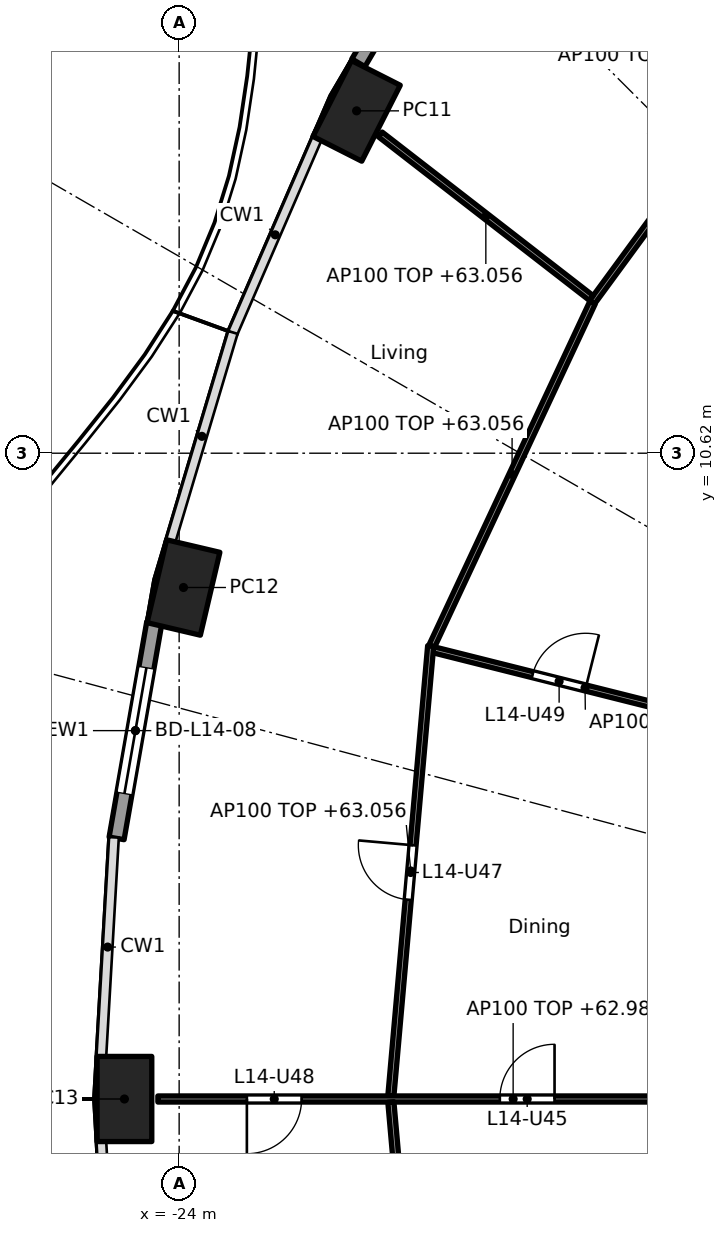
"""IFC4 building model, lengths in metres.
Left out: names, types, materials, properties, quantities, classifications, styles, units other than length and angle.
Written with IfcOpenShell. Run it as: python <this file> out.ifc"""

import sys

from ifc_helpers import new_model, si_unit, direction, frame, frame_2d, origin, origin_2d, place, context, subcontext, project, spatial, rectangle, hollow_rectangle, extrude, element, fill, save


model = new_model("IFC4")
c1 = context("Model", 3, precision=1e-05, world=origin(), true_north=direction((0.0, 1.0)))
c2 = subcontext(c1, "Body", "Model", "MODEL_VIEW")
j1 = project(units=[si_unit("LENGTHUNIT", "METRE"), si_unit("PLANEANGLEUNIT", "RADIAN")], contexts=[c1])
p1 = place(None, origin())
s1 = spatial("IfcSite", under=j1, at=p1, CompositionType="ELEMENT")
p2 = place(p1, origin())
s2 = spatial("IfcBuilding", under=s1, at=p2, CompositionType="ELEMENT")
p3 = place(p2, frame((0.0, 0.0, 60.3)))
s3 = spatial("IfcBuildingStorey", under=s2, at=p3, CompositionType="ELEMENT", Elevation=60.3)
for number, where, z_axis, x_axis in (
    (1, (-21.082, 16.25, 0.0), (0.0, 0.0, 1.0), (-0.452, -0.892, 0.0)),
    (2, (-23.929, 8.412, 0.0), (0.0, 0.0, 1.0), (-0.229, -0.973, 0.0)),
    (3, (-24.9, 0.0, 0.0), (0.0, 0.0, 1.0), (0.0, -1.0, 0.0)),
):
    element("IfcColumn", number, at=place(p3, frame(where, z_axis=z_axis, x_axis=x_axis)), inside=s3, PredefinedType="COLUMN", context=c2, shape_type="SweptSolid", body=[
        extrude(hollow_rectangle(XDim=1.4, YDim=0.9, WallThickness=0.05, at=origin_2d()), origin(), (0.0, 0.0, 1.0), 3.7),
    ])
p4 = place(p3, frame((-21.052, 17.04, 0.0), z_axis=(0.0, 0.0, 1.0), x_axis=(0.506311160839, 0.862350861546, 0.0)))
e4 = element("IfcWall", 4, at=p4, inside=s3, PredefinedType="SOLIDWALL", context=c2, shape_type="SweptSolid", body=[
    extrude(rectangle(XDim=3.462, YDim=0.25, at=frame_2d((1.731, 0.0))), origin(), (0.0, 0.0, 1.0), 3.44),
])
p5 = place(p4, frame((0.681, 0.0, 0.0)))
e5 = element("IfcOpeningElement", 5, at=p5, cuts=e4, PredefinedType="OPENING", context=c2, shape_type="SweptSolid", body=[
    extrude(rectangle(XDim=2.1, YDim=2.4, at=frame_2d((1.05, 1.2))), frame((0.0, 0.135, 0.0), z_axis=(0.0, -1.0, 0.0), x_axis=(1.0, 0.0, 0.0)), (0.0, 0.0, 1.0), 0.27),
])
p6 = place(p3, frame((-25.029, 4.286, 0.0), z_axis=(0.0, 0.0, 1.0), x_axis=(0.172217377323, 0.98505897029, 0.0)))
e6 = element("IfcWall", 6, at=p6, inside=s3, PredefinedType="SOLIDWALL", context=c2, shape_type="SweptSolid", body=[
    extrude(rectangle(XDim=3.598, YDim=0.25, at=frame_2d((1.799, 0.0))), origin(), (0.0, 0.0, 1.0), 3.44),
])
p7 = place(p6, frame((0.749, 0.0, 0.0)))
e7 = element("IfcOpeningElement", 7, at=p7, cuts=e6, PredefinedType="OPENING", context=c2, shape_type="SweptSolid", body=[
    extrude(rectangle(XDim=2.1, YDim=2.4, at=frame_2d((1.05, 1.2))), frame((0.0, 0.135, 0.0), z_axis=(0.0, -1.0, 0.0), x_axis=(1.0, 0.0, 0.0)), (0.0, 0.0, 1.0), 0.27),
])
p8 = place(p3, frame((-10.126, 13.641, 0.0), z_axis=(0.0, 0.0, 1.0), x_axis=(-0.57313289907, 0.819462433552, 0.0)))
e8 = element("IfcWall", 8, at=p8, inside=s3, PredefinedType="PARTITIONING", context=c2, shape_type="SweptSolid", body=[
    extrude(rectangle(XDim=10.794, YDim=0.1, at=frame_2d((5.397, 0.0))), origin(), (0.0, 0.0, 1.0), 2.756),
])
p9 = place(p8, frame((2.424, 0.0, 0.0)))
e9 = element("IfcOpeningElement", 9, at=p9, cuts=e8, PredefinedType="OPENING", context=c2, shape_type="SweptSolid", body=[
    extrude(rectangle(XDim=0.9, YDim=2.1, at=frame_2d((0.45, 1.05))), frame((0.0, 0.06, 0.0), z_axis=(0.0, -1.0, 0.0), x_axis=(1.0, 0.0, 0.0)), (0.0, 0.0, 1.0), 0.12),
])
p10 = place(p3, frame((-13.421, 18.269, 0.0), z_axis=(0.0, 0.0, 1.0), x_axis=(-0.591206785834, -0.806520016109, 0.0)))
e10 = element("IfcWall", 10, at=p10, inside=s3, PredefinedType="PARTITIONING", context=c2, shape_type="SweptSolid", body=[
    extrude(rectangle(XDim=6.41, YDim=0.1, at=frame_2d((3.205, 0.0))), origin(), (0.0, 0.0, 1.0), 2.756),
])
p11 = place(p10, frame((2.73, 0.0, 0.0)))
e11 = element("IfcOpeningElement", 11, at=p11, cuts=e10, PredefinedType="OPENING", context=c2, shape_type="SweptSolid", body=[
    extrude(rectangle(XDim=0.9, YDim=2.1, at=frame_2d((0.45, 1.05))), frame((0.0, 0.06, 0.0), z_axis=(0.0, -1.0, 0.0), x_axis=(1.0, 0.0, 0.0)), (0.0, 0.0, 1.0), 0.12),
])
p12 = place(p3, frame((-17.221, 13.171, 0.0), z_axis=(0.0, 0.0, 1.0), x_axis=(-0.790258254068, 0.612773932113, 0.0)))
e12 = element("IfcWall", 12, at=p12, inside=s3, PredefinedType="PARTITIONING", context=c2, shape_type="SweptSolid", body=[
    extrude(rectangle(XDim=4.392, YDim=0.1, at=frame_2d((2.196, 0.0))), origin(), (0.0, 0.0, 1.0), 2.756),
])
p13 = place(p3, frame((-17.203, 13.095, 0.0), z_axis=(0.0, 0.0, 1.0), x_axis=(-0.423892287987, -0.905712607942, 0.0)))
e13 = element("IfcWall", 13, at=p13, inside=s3, PredefinedType="PARTITIONING", context=c2, shape_type="SweptSolid", body=[
    extrude(rectangle(XDim=6.238, YDim=0.1, at=frame_2d((3.119, 0.0))), origin(), (0.0, 0.0, 1.0), 2.756),
])
p14 = place(p3, frame((-14.831, 6.135, 0.0), z_axis=(0.0, 0.0, 1.0), x_axis=(-0.96988230015, 0.243574062362, 0.0)))
e14 = element("IfcWall", 14, at=p14, inside=s3, PredefinedType="PARTITIONING", context=c2, shape_type="SweptSolid", body=[
    extrude(rectangle(XDim=5.144, YDim=0.1, at=frame_2d((2.572, 0.0))), origin(), (0.0, 0.0, 1.0), 3.44),
])
p15 = place(p14, frame((2.561, 0.0, 0.0)))
e15 = element("IfcOpeningElement", 15, at=p15, cuts=e14, PredefinedType="OPENING", context=c2, shape_type="SweptSolid", body=[
    extrude(rectangle(XDim=0.9, YDim=2.1, at=frame_2d((0.45, 1.05))), frame((0.0, 0.06, 0.0), z_axis=(0.0, -1.0, 0.0), x_axis=(1.0, 0.0, 0.0)), (0.0, 0.0, 1.0), 0.12),
])
p16 = place(p3, frame((-19.864, 7.45, 0.0), z_axis=(0.0, 0.0, 1.0), x_axis=(-0.088138375539, -0.996108240483, 0.0)))
e16 = element("IfcWall", 16, at=p16, inside=s3, PredefinedType="PARTITIONING", context=c2, shape_type="SweptSolid", body=[
    extrude(rectangle(XDim=7.429, YDim=0.1, at=frame_2d((3.714, 0.0))), origin(), (0.0, 0.0, 1.0), 2.756),
])
p17 = place(p16, frame((3.29, 0.0, 0.0)))
e17 = element("IfcOpeningElement", 17, at=p17, cuts=e16, PredefinedType="OPENING", context=c2, shape_type="SweptSolid", body=[
    extrude(rectangle(XDim=0.9, YDim=2.1, at=frame_2d((0.45, 1.05))), frame((0.0, 0.06, 0.0), z_axis=(0.0, -1.0, 0.0), x_axis=(1.0, 0.0, 0.0)), (0.0, 0.0, 1.0), 0.12),
])
p18 = place(p3, frame((-12.665, 0.0, 0.0), z_axis=(0.0, 0.0, 1.0), x_axis=(-1.0, 0.0, 0.0)))
e18 = element("IfcWall", 18, at=p18, inside=s3, PredefinedType="PARTITIONING", context=c2, shape_type="SweptSolid", body=[
    extrude(rectangle(XDim=11.685, YDim=0.1, at=frame_2d((5.843, 0.0))), origin(), (0.0, 0.0, 1.0), 2.687),
])
p19 = place(p18, frame((1.233, 0.0, 0.0)))
e19 = element("IfcOpeningElement", 19, at=p19, cuts=e18, PredefinedType="OPENING", context=c2, shape_type="SweptSolid", body=[
    extrude(rectangle(XDim=0.9, YDim=2.1, at=frame_2d((0.45, 1.05))), frame((0.0, 0.06, 0.0), z_axis=(0.0, -1.0, 0.0), x_axis=(1.0, 0.0, 0.0)), (0.0, 0.0, 1.0), 0.12),
])
p20 = place(p18, frame((5.162, 0.0, 0.0)))
e20 = element("IfcOpeningElement", 20, at=p20, cuts=e18, PredefinedType="OPENING", context=c2, shape_type="SweptSolid", body=[
    extrude(rectangle(XDim=0.9, YDim=2.1, at=frame_2d((0.45, 1.05))), frame((0.0, 0.06, 0.0), z_axis=(0.0, -1.0, 0.0), x_axis=(1.0, 0.0, 0.0)), (0.0, 0.0, 1.0), 0.12),
])
p21 = place(p18, frame((9.322, 0.0, 0.0)))
e21 = element("IfcOpeningElement", 21, at=p21, cuts=e18, PredefinedType="OPENING", context=c2, shape_type="SweptSolid", body=[
    extrude(rectangle(XDim=0.9, YDim=2.1, at=frame_2d((0.45, 1.05))), frame((0.0, 0.06, 0.0), z_axis=(0.0, -1.0, 0.0), x_axis=(1.0, 0.0, 0.0)), (0.0, 0.0, 1.0), 0.12),
])
p22 = place(p3, frame((-20.518, -0.05, 0.0), z_axis=(0.0, 0.0, 1.0), x_axis=(0.088143415068, -0.996107794558, 0.0)))
e22 = element("IfcWall", 22, at=p22, inside=s3, PredefinedType="PARTITIONING", context=c2, shape_type="SweptSolid", body=[
    extrude(rectangle(XDim=7.279, YDim=0.1, at=frame_2d((3.64, 0.0))), origin(), (0.0, 0.0, 1.0), 2.756),
])
p23 = place(p7, origin())
e23 = element("IfcDoor", 23, at=p23, inside=s3, OperationType="SLIDING_TO_LEFT", PredefinedType="DOOR", context=c2, shape_type="SweptSolid", body=[
    extrude(rectangle(XDim=2.1, YDim=2.4, at=frame_2d((1.05, 1.2))), frame((0.0, 0.025, 0.0), z_axis=(0.0, -1.0, 0.0), x_axis=(1.0, 0.0, 0.0)), (0.0, 0.0, 1.0), 0.05),
])
fill(e7, e23)
p24 = place(p20, frame((0.9, 0.0, 0.0), x_axis=(-1.0, 0.0, 0.0)))
e24 = element("IfcDoor", 24, at=p24, inside=s3, OperationType="SINGLE_SWING_RIGHT", PredefinedType="DOOR", context=c2, shape_type="SweptSolid", body=[
    extrude(rectangle(XDim=0.9, YDim=2.1, at=frame_2d((0.45, 1.05))), frame((0.0, 0.025, 0.0), z_axis=(0.0, -1.0, 0.0), x_axis=(1.0, 0.0, 0.0)), (0.0, 0.0, 1.0), 0.05),
])
fill(e20, e24)
p25 = place(p17, frame((0.9, 0.0, 0.0), x_axis=(-1.0, 0.0, 0.0)))
e25 = element("IfcDoor", 25, at=p25, inside=s3, OperationType="SINGLE_SWING_RIGHT", PredefinedType="DOOR", context=c2, shape_type="SweptSolid", body=[
    extrude(rectangle(XDim=0.9, YDim=2.1, at=frame_2d((0.45, 1.05))), frame((0.0, 0.025, 0.0), z_axis=(0.0, -1.0, 0.0), x_axis=(1.0, 0.0, 0.0)), (0.0, 0.0, 1.0), 0.05),
])
fill(e17, e25)
p26 = place(p21, origin())
e26 = element("IfcDoor", 26, at=p26, inside=s3, OperationType="SINGLE_SWING_RIGHT", PredefinedType="DOOR", context=c2, shape_type="SweptSolid", body=[
    extrude(rectangle(XDim=0.9, YDim=2.1, at=frame_2d((0.45, 1.05))), frame((0.0, 0.025, 0.0), z_axis=(0.0, -1.0, 0.0), x_axis=(1.0, 0.0, 0.0)), (0.0, 0.0, 1.0), 0.05),
])
fill(e21, e26)
p27 = place(p15, frame((0.9, 0.0, 0.0), x_axis=(-1.0, 0.0, 0.0)))
e27 = element("IfcDoor", 27, at=p27, inside=s3, OperationType="SINGLE_SWING_RIGHT", PredefinedType="DOOR", context=c2, shape_type="SweptSolid", body=[
    extrude(rectangle(XDim=0.9, YDim=2.1, at=frame_2d((0.45, 1.05))), frame((0.0, 0.025, 0.0), z_axis=(0.0, -1.0, 0.0), x_axis=(1.0, 0.0, 0.0)), (0.0, 0.0, 1.0), 0.05),
])
fill(e15, e27)
save(model, sys.argv[1])
